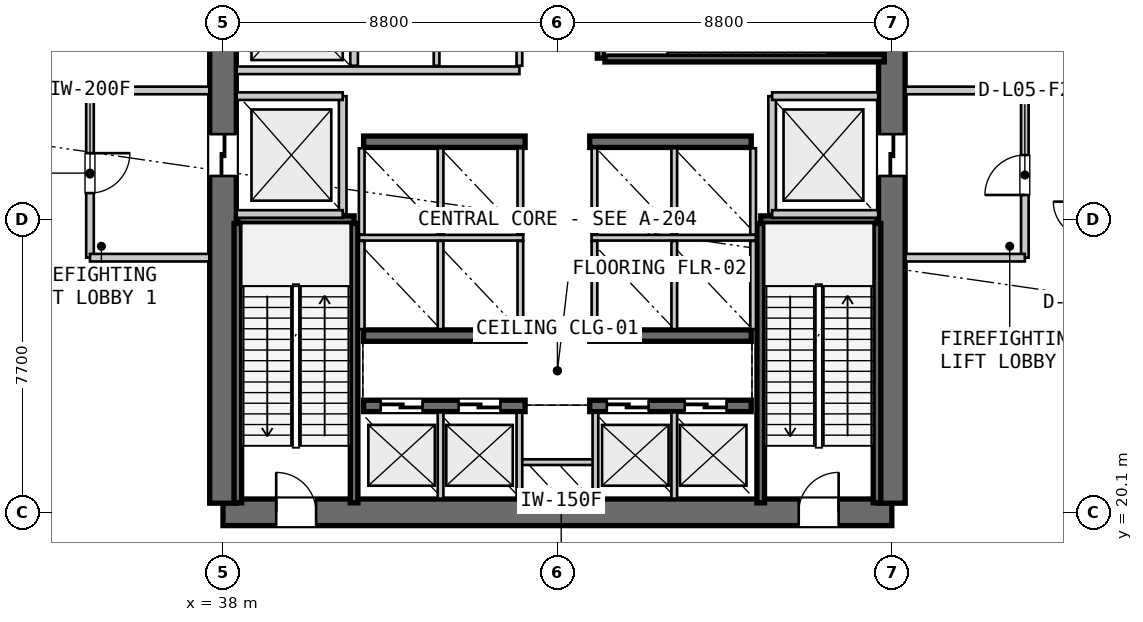
"""IFC4 building model, lengths in metres.
Left out: names, types, materials, properties, quantities, classifications, styles, units other than length and angle.
Written with IfcOpenShell. Run it as: python <this file> out.ifc"""

import sys

from ifc_helpers import new_model, si_unit, direction, frame, frame_2d, origin, place, context, subcontext, project, spatial, rectangle, extrude, source, transform, mapped, element, fill, save


model = new_model("IFC4")
c1 = context("Model", 3, precision=1e-05, world=origin(), true_north=direction((0.0, 1.0)))
c2 = subcontext(c1, "Body", "Model", "MODEL_VIEW")
j1 = project(units=[si_unit("LENGTHUNIT", "METRE"), si_unit("PLANEANGLEUNIT", "RADIAN")], contexts=[c1])
p1 = place(None, origin())
s1 = spatial("IfcSite", under=j1, at=p1, CompositionType="ELEMENT")
p2 = place(p1, origin())
s2 = spatial("IfcBuilding", under=s1, at=p2, CompositionType="ELEMENT")
p3 = place(p2, frame((0.0, 0.0, 24.0)))
s3 = spatial("IfcBuildingStorey", under=s2, at=p3, CompositionType="ELEMENT", Elevation=24.0)
p4 = place(p3, frame((38.0, 20.1, 0.0), z_axis=(0.0, 0.0, 1.0), x_axis=(1.0, 0.0, 0.0)))
e1 = element("IfcWall", 1, at=p4, inside=s3, PredefinedType="SHEAR", context=c2, shape_type="SweptSolid", body=[
    extrude(rectangle(XDim=17.6, YDim=0.7, at=frame_2d((8.8, 0.0))), origin(), (0.0, 0.0, 1.0), 5.12),
])
p5 = place(p4, frame((1.4, 0.0, 0.0)))
e2 = element("IfcOpeningElement", 2, at=p5, cuts=e1, PredefinedType="OPENING", context=c2, shape_type="SweptSolid", body=[
    extrude(rectangle(XDim=1.05, YDim=2.15, at=frame_2d((0.525, 1.075))), frame((0.0, 0.36, 0.0), z_axis=(0.0, -1.0, 0.0), x_axis=(1.0, 0.0, 0.0)), (0.0, 0.0, 1.0), 0.72),
])
p6 = place(p4, frame((15.15, 0.0, 0.0)))
e3 = element("IfcOpeningElement", 3, at=p6, cuts=e1, PredefinedType="OPENING", context=c2, shape_type="SweptSolid", body=[
    extrude(rectangle(XDim=1.05, YDim=2.15, at=frame_2d((0.525, 1.075))), frame((0.0, 0.36, 0.0), z_axis=(0.0, -1.0, 0.0), x_axis=(1.0, 0.0, 0.0)), (0.0, 0.0, 1.0), 0.72),
])
p7 = place(p3, frame((38.0, 35.26, 0.0), z_axis=(0.0, 0.0, 1.0), x_axis=(0.0, -1.0, 0.0)))
e4 = element("IfcWall", 4, at=p7, inside=s3, PredefinedType="SHEAR", context=c2, shape_type="SweptSolid", body=[
    extrude(rectangle(XDim=14.92, YDim=0.7, at=frame_2d((7.46, 0.0))), origin(), (0.0, 0.0, 1.0), 5.12),
])
p8 = place(p7, frame((5.21, 0.0, 0.0)))
e5 = element("IfcOpeningElement", 5, at=p8, cuts=e4, PredefinedType="OPENING", context=c2, shape_type="SweptSolid", body=[
    extrude(rectangle(XDim=1.1, YDim=2.2, at=frame_2d((0.55, 1.1))), frame((0.0, 0.36, 0.0), z_axis=(0.0, -1.0, 0.0), x_axis=(1.0, 0.0, 0.0)), (0.0, 0.0, 1.0), 0.72),
])
p9 = place(p3, frame((55.6, 20.34, 0.0), z_axis=(0.0, 0.0, 1.0), x_axis=(0.0, 1.0, 0.0)))
e6 = element("IfcWall", 6, at=p9, inside=s3, PredefinedType="SHEAR", context=c2, shape_type="SweptSolid", body=[
    extrude(rectangle(XDim=14.92, YDim=0.7, at=frame_2d((7.46, 0.0))), origin(), (0.0, 0.0, 1.0), 5.12),
])
p10 = place(p9, frame((12.71, 0.0, 0.0)))
e7 = element("IfcOpeningElement", 7, at=p10, cuts=e6, PredefinedType="OPENING", context=c2, shape_type="SweptSolid", body=[
    extrude(rectangle(XDim=1.05, YDim=2.15, at=frame_2d((0.525, 1.075))), frame((0.0, 0.36, 0.0), z_axis=(0.0, -1.0, 0.0), x_axis=(1.0, 0.0, 0.0)), (0.0, 0.0, 1.0), 0.72),
])
p11 = place(p9, frame((8.61, 0.0, 0.0)))
e8 = element("IfcOpeningElement", 8, at=p11, cuts=e6, PredefinedType="OPENING", context=c2, shape_type="SweptSolid", body=[
    extrude(rectangle(XDim=1.1, YDim=2.2, at=frame_2d((0.55, 1.1))), frame((0.0, 0.36, 0.0), z_axis=(0.0, -1.0, 0.0), x_axis=(1.0, 0.0, 0.0)), (0.0, 0.0, 1.0), 0.72),
])
p12 = place(p3, frame((41.7, 22.9, 0.0), z_axis=(0.0, 0.0, 1.0), x_axis=(1.0, 0.0, 0.0)))
e9 = element("IfcWall", 9, at=p12, inside=s3, PredefinedType="SHEAR", context=c2, shape_type="SweptSolid", body=[
    extrude(rectangle(XDim=4.25, YDim=0.3, at=frame_2d((2.125, 0.0))), origin(), (0.0, 0.0, 1.0), 5.12),
])
p13 = place(p12, frame((0.45, 0.0, 0.0)))
e10 = element("IfcOpeningElement", 10, at=p13, cuts=e9, PredefinedType="OPENING", context=c2, shape_type="SweptSolid", body=[
    extrude(rectangle(XDim=1.1, YDim=2.2, at=frame_2d((0.55, 1.1))), frame((0.0, 0.16, 0.0), z_axis=(0.0, -1.0, 0.0), x_axis=(1.0, 0.0, 0.0)), (0.0, 0.0, 1.0), 0.32),
])
p14 = place(p12, frame((2.5, 0.0, 0.0)))
e11 = element("IfcOpeningElement", 11, at=p14, cuts=e9, PredefinedType="OPENING", context=c2, shape_type="SweptSolid", body=[
    extrude(rectangle(XDim=1.1, YDim=2.2, at=frame_2d((0.55, 1.1))), frame((0.0, 0.16, 0.0), z_axis=(0.0, -1.0, 0.0), x_axis=(1.0, 0.0, 0.0)), (0.0, 0.0, 1.0), 0.32),
])
p15 = place(p3, frame((47.65, 22.9, 0.0), z_axis=(0.0, 0.0, 1.0), x_axis=(1.0, 0.0, 0.0)))
e12 = element("IfcWall", 12, at=p15, inside=s3, PredefinedType="SHEAR", context=c2, shape_type="SweptSolid", body=[
    extrude(rectangle(XDim=4.25, YDim=0.3, at=frame_2d((2.125, 0.0))), origin(), (0.0, 0.0, 1.0), 5.12),
])
p16 = place(p15, frame((0.45, 0.0, 0.0)))
e13 = element("IfcOpeningElement", 13, at=p16, cuts=e12, PredefinedType="OPENING", context=c2, shape_type="SweptSolid", body=[
    extrude(rectangle(XDim=1.1, YDim=2.2, at=frame_2d((0.55, 1.1))), frame((0.0, 0.16, 0.0), z_axis=(0.0, -1.0, 0.0), x_axis=(1.0, 0.0, 0.0)), (0.0, 0.0, 1.0), 0.32),
])
p17 = place(p15, frame((2.5, 0.0, 0.0)))
e14 = element("IfcOpeningElement", 14, at=p17, cuts=e12, PredefinedType="OPENING", context=c2, shape_type="SweptSolid", body=[
    extrude(rectangle(XDim=1.1, YDim=2.2, at=frame_2d((0.55, 1.1))), frame((0.0, 0.16, 0.0), z_axis=(0.0, -1.0, 0.0), x_axis=(1.0, 0.0, 0.0)), (0.0, 0.0, 1.0), 0.32),
])
for number, where, z_axis, x_axis in (
    (15, (41.7, 24.75, 0.0), (0.0, 0.0, 1.0), (1.0, 0.0, 0.0)),
    (16, (47.65, 24.75, 0.0), (0.0, 0.0, 1.0), (1.0, 0.0, 0.0)),
    (17, (41.7, 29.85, 0.0), (0.0, 0.0, 1.0), (1.0, 0.0, 0.0)),
    (18, (47.65, 29.85, 0.0), (0.0, 0.0, 1.0), (1.0, 0.0, 0.0)),
):
    element("IfcWall", number, at=place(p3, frame(where, z_axis=z_axis, x_axis=x_axis)), inside=s3, PredefinedType="SHEAR", context=c2, shape_type="SweptSolid", body=[
        extrude(rectangle(XDim=4.25, YDim=0.3, at=frame_2d((2.125, 0.0))), origin(), (0.0, 0.0, 1.0), 5.12),
    ])
p18 = place(p3, frame((38.39, 27.8, 0.0), z_axis=(0.0, 0.0, 1.0), x_axis=(1.0, 0.0, 0.0)))
e19 = element("IfcWall", 19, at=p18, inside=s3, PredefinedType="SHEAR", context=c2, shape_type="SweptSolid", body=[
    extrude(rectangle(XDim=3.06, YDim=0.2, at=frame_2d((1.53, 0.0))), origin(), (0.0, 0.0, 1.0), 5.12),
])
for number, where, z_axis, x_axis in (
    (20, (41.45, 27.7, 0.0), (0.0, 0.0, 1.0), (0.0, -1.0, 0.0)),
    (21, (38.39, 20.35, 0.0), (0.0, 0.0, 1.0), (0.0, 1.0, 0.0)),
):
    element("IfcWall", number, at=place(p3, frame(where, z_axis=z_axis, x_axis=x_axis)), inside=s3, PredefinedType="SHEAR", context=c2, shape_type="SweptSolid", body=[
        extrude(rectangle(XDim=7.35, YDim=0.2, at=frame_2d((3.675, 0.0))), origin(), (0.0, 0.0, 1.0), 5.12),
    ])
p19 = place(p3, frame((52.15, 27.8, 0.0), z_axis=(0.0, 0.0, 1.0), x_axis=(1.0, 0.0, 0.0)))
e22 = element("IfcWall", 22, at=p19, inside=s3, PredefinedType="SHEAR", context=c2, shape_type="SweptSolid", body=[
    extrude(rectangle(XDim=3.06, YDim=0.2, at=frame_2d((1.53, 0.0))), origin(), (0.0, 0.0, 1.0), 5.12),
])
for number, where, z_axis, x_axis in (
    (23, (55.21, 27.7, 0.0), (0.0, 0.0, 1.0), (0.0, -1.0, 0.0)),
    (24, (52.15, 20.35, 0.0), (0.0, 0.0, 1.0), (0.0, 1.0, 0.0)),
):
    element("IfcWall", number, at=place(p3, frame(where, z_axis=z_axis, x_axis=x_axis)), inside=s3, PredefinedType="SHEAR", context=c2, shape_type="SweptSolid", body=[
        extrude(rectangle(XDim=7.35, YDim=0.2, at=frame_2d((3.675, 0.0))), origin(), (0.0, 0.0, 1.0), 5.12),
    ])
p20 = place(p3, frame((47.95, 32.05, 0.0), z_axis=(0.0, 0.0, 1.0), x_axis=(0.0, 1.0, 0.0)))
e25 = element("IfcWall", 25, at=p20, inside=s3, PredefinedType="SHEAR", context=c2, shape_type="SweptSolid", body=[
    extrude(rectangle(XDim=3.06, YDim=0.2, at=frame_2d((1.53, 0.0))), origin(), (0.0, 0.0, 1.0), 5.12),
])
p21 = place(p3, frame((55.4, 32.05, 0.0), z_axis=(0.0, 0.0, 1.0), x_axis=(-1.0, 0.0, 0.0)))
e26 = element("IfcWall", 26, at=p21, inside=s3, PredefinedType="SHEAR", context=c2, shape_type="SweptSolid", body=[
    extrude(rectangle(XDim=7.35, YDim=0.2, at=frame_2d((3.675, 0.0))), origin(), (0.0, 0.0, 1.0), 5.12),
])
p22 = place(p3, frame((45.8, 21.42, 0.0), z_axis=(0.0, 0.0, 1.0), x_axis=(1.0, 0.0, 0.0)))
e27 = element("IfcWall", 27, at=p22, inside=s3, PredefinedType="PARTITIONING", context=c2, shape_type="SweptSolid", body=[
    extrude(rectangle(XDim=2.0, YDim=0.15, at=frame_2d((1.0, 0.0))), origin(), (0.0, 0.0, 1.0), 2.295),
])
for number, where, z_axis, x_axis in (
    (28, (45.8, 20.48, 0.0), (0.0, 0.0, 1.0), (0.0, 1.0, 0.0)),
    (29, (47.8, 20.48, 0.0), (0.0, 0.0, 1.0), (0.0, 1.0, 0.0)),
):
    element("IfcWall", number, at=place(p3, frame(where, z_axis=z_axis, x_axis=x_axis)), inside=s3, PredefinedType="PARTITIONING", context=c2, shape_type="SweptSolid", body=[
        extrude(rectangle(XDim=2.24, YDim=0.15, at=frame_2d((1.12, 0.0))), origin(), (0.0, 0.0, 1.0), 2.295),
    ])
p23 = place(p3, frame((41.15, 27.95, 0.0), z_axis=(0.0, 0.0, 1.0), x_axis=(0.0, 1.0, 0.0)))
e30 = element("IfcWall", 30, at=p23, inside=s3, PredefinedType="PARTITIONING", context=c2, shape_type="SweptSolid", body=[
    extrude(rectangle(XDim=3.1, YDim=0.2, at=frame_2d((1.55, 0.0))), origin(), (0.0, 0.0, 1.0), 2.295),
])
for number, where, z_axis, x_axis in (
    (31, (38.36, 27.95, 0.0), (0.0, 0.0, 1.0), (1.0, 0.0, 0.0)),
    (32, (38.36, 31.05, 0.0), (0.0, 0.0, 1.0), (1.0, 0.0, 0.0)),
):
    element("IfcWall", number, at=place(p3, frame(where, z_axis=z_axis, x_axis=x_axis)), inside=s3, PredefinedType="PARTITIONING", context=c2, shape_type="SweptSolid", body=[
        extrude(rectangle(XDim=2.79, YDim=0.2, at=frame_2d((1.395, 0.0))), origin(), (0.0, 0.0, 1.0), 2.295),
    ])
p24 = place(p3, frame((34.5, 31.2, 0.0), z_axis=(0.0, 0.0, 1.0), x_axis=(0.0, -1.0, 0.0)))
e33 = element("IfcWall", 33, at=p24, inside=s3, PredefinedType="PARTITIONING", context=c2, shape_type="SweptSolid", body=[
    extrude(rectangle(XDim=4.4, YDim=0.2, at=frame_2d((2.2, 0.0))), origin(), (0.0, 0.0, 1.0), 2.295),
])
p25 = place(p24, frame((1.65, 0.0, 0.0)))
e34 = element("IfcOpeningElement", 34, at=p25, cuts=e33, PredefinedType="OPENING", context=c2, shape_type="SweptSolid", body=[
    extrude(rectangle(XDim=1.05, YDim=2.15, at=frame_2d((0.525, 1.075))), frame((0.0, 0.11, 0.0), z_axis=(0.0, -1.0, 0.0), x_axis=(1.0, 0.0, 0.0)), (0.0, 0.0, 1.0), 0.22),
])
for number, where, z_axis, x_axis in (
    (35, (34.5, 26.8, 0.0), (0.0, 0.0, 1.0), (1.0, 0.0, 0.0)),
    (36, (34.5, 31.2, 0.0), (0.0, 0.0, 1.0), (1.0, 0.0, 0.0)),
):
    element("IfcWall", number, at=place(p3, frame(where, z_axis=z_axis, x_axis=x_axis)), inside=s3, PredefinedType="PARTITIONING", context=c2, shape_type="SweptSolid", body=[
        extrude(rectangle(XDim=3.14, YDim=0.2, at=frame_2d((1.57, 0.0))), origin(), (0.0, 0.0, 1.0), 2.295),
    ])
p26 = place(p3, frame((52.45, 27.95, 0.0), z_axis=(0.0, 0.0, 1.0), x_axis=(0.0, 1.0, 0.0)))
e37 = element("IfcWall", 37, at=p26, inside=s3, PredefinedType="PARTITIONING", context=c2, shape_type="SweptSolid", body=[
    extrude(rectangle(XDim=3.1, YDim=0.2, at=frame_2d((1.55, 0.0))), origin(), (0.0, 0.0, 1.0), 2.295),
])
for number, where, z_axis, x_axis in (
    (38, (52.45, 27.95, 0.0), (0.0, 0.0, 1.0), (1.0, 0.0, 0.0)),
    (39, (52.45, 31.05, 0.0), (0.0, 0.0, 1.0), (1.0, 0.0, 0.0)),
):
    element("IfcWall", number, at=place(p3, frame(where, z_axis=z_axis, x_axis=x_axis)), inside=s3, PredefinedType="PARTITIONING", context=c2, shape_type="SweptSolid", body=[
        extrude(rectangle(XDim=2.79, YDim=0.2, at=frame_2d((1.395, 0.0))), origin(), (0.0, 0.0, 1.0), 2.295),
    ])
p27 = place(p3, frame((59.1, 26.8, 0.0), z_axis=(0.0, 0.0, 1.0), x_axis=(0.0, 1.0, 0.0)))
e40 = element("IfcWall", 40, at=p27, inside=s3, PredefinedType="PARTITIONING", context=c2, shape_type="SweptSolid", body=[
    extrude(rectangle(XDim=4.4, YDim=0.2, at=frame_2d((2.2, 0.0))), origin(), (0.0, 0.0, 1.0), 2.295),
])
p28 = place(p27, frame((1.65, 0.0, 0.0)))
e41 = element("IfcOpeningElement", 41, at=p28, cuts=e40, PredefinedType="OPENING", context=c2, shape_type="SweptSolid", body=[
    extrude(rectangle(XDim=1.05, YDim=2.15, at=frame_2d((0.525, 1.075))), frame((0.0, 0.11, 0.0), z_axis=(0.0, -1.0, 0.0), x_axis=(1.0, 0.0, 0.0)), (0.0, 0.0, 1.0), 0.22),
])
for number, where, z_axis, x_axis in (
    (42, (55.96, 26.8, 0.0), (0.0, 0.0, 1.0), (1.0, 0.0, 0.0)),
    (43, (55.96, 31.2, 0.0), (0.0, 0.0, 1.0), (1.0, 0.0, 0.0)),
):
    element("IfcWall", number, at=place(p3, frame(where, z_axis=z_axis, x_axis=x_axis)), inside=s3, PredefinedType="PARTITIONING", context=c2, shape_type="SweptSolid", body=[
        extrude(rectangle(XDim=3.14, YDim=0.2, at=frame_2d((1.57, 0.0))), origin(), (0.0, 0.0, 1.0), 2.295),
    ])
for number, where, z_axis, x_axis in (
    (44, (43.725, 20.46, 0.0), (0.0, 0.0, 1.0), (0.0, 1.0, 0.0)),
    (45, (49.875, 20.46, 0.0), (0.0, 0.0, 1.0), (0.0, 1.0, 0.0)),
):
    element("IfcWall", number, at=place(p3, frame(where, z_axis=z_axis, x_axis=x_axis)), inside=s3, PredefinedType="PARTITIONING", context=c2, shape_type="SweptSolid", body=[
        extrude(rectangle(XDim=2.27, YDim=0.15, at=frame_2d((1.135, 0.0))), origin(), (0.0, 0.0, 1.0), 2.295),
    ])
p29 = place(p3, frame((41.58, 27.325, 0.0), z_axis=(0.0, 0.0, 1.0), x_axis=(1.0, 0.0, 0.0)))
e46 = element("IfcWall", 46, at=p29, inside=s3, PredefinedType="PARTITIONING", context=c2, shape_type="SweptSolid", body=[
    extrude(rectangle(XDim=4.32, YDim=0.15, at=frame_2d((2.16, 0.0))), origin(), (0.0, 0.0, 1.0), 2.295),
])
p30 = place(p3, frame((47.7, 27.325, 0.0), z_axis=(0.0, 0.0, 1.0), x_axis=(1.0, 0.0, 0.0)))
e47 = element("IfcWall", 47, at=p30, inside=s3, PredefinedType="PARTITIONING", context=c2, shape_type="SweptSolid", body=[
    extrude(rectangle(XDim=4.32, YDim=0.15, at=frame_2d((2.16, 0.0))), origin(), (0.0, 0.0, 1.0), 2.295),
])
for number, where, z_axis, x_axis in (
    (48, (41.65, 24.92, 0.0), (0.0, 0.0, 1.0), (0.0, 1.0, 0.0)),
    (49, (43.725, 24.92, 0.0), (0.0, 0.0, 1.0), (0.0, 1.0, 0.0)),
    (50, (45.825, 24.92, 0.0), (0.0, 0.0, 1.0), (0.0, 1.0, 0.0)),
    (51, (47.775, 24.92, 0.0), (0.0, 0.0, 1.0), (0.0, 1.0, 0.0)),
    (52, (49.875, 24.92, 0.0), (0.0, 0.0, 1.0), (0.0, 1.0, 0.0)),
    (53, (51.95, 24.92, 0.0), (0.0, 0.0, 1.0), (0.0, 1.0, 0.0)),
):
    element("IfcWall", number, at=place(p3, frame(where, z_axis=z_axis, x_axis=x_axis)), inside=s3, PredefinedType="PARTITIONING", context=c2, shape_type="SweptSolid", body=[
        extrude(rectangle(XDim=2.32, YDim=0.15, at=frame_2d((1.16, 0.0))), origin(), (0.0, 0.0, 1.0), 2.295),
    ])
for number, where, z_axis, x_axis in (
    (54, (41.65, 27.41, 0.0), (0.0, 0.0, 1.0), (0.0, 1.0, 0.0)),
    (55, (43.725, 27.41, 0.0), (0.0, 0.0, 1.0), (0.0, 1.0, 0.0)),
    (56, (45.825, 27.41, 0.0), (0.0, 0.0, 1.0), (0.0, 1.0, 0.0)),
    (57, (47.775, 27.41, 0.0), (0.0, 0.0, 1.0), (0.0, 1.0, 0.0)),
    (58, (49.875, 27.41, 0.0), (0.0, 0.0, 1.0), (0.0, 1.0, 0.0)),
    (59, (51.95, 27.41, 0.0), (0.0, 0.0, 1.0), (0.0, 1.0, 0.0)),
):
    element("IfcWall", number, at=place(p3, frame(where, z_axis=z_axis, x_axis=x_axis)), inside=s3, PredefinedType="PARTITIONING", context=c2, shape_type="SweptSolid", body=[
        extrude(rectangle(XDim=2.27, YDim=0.15, at=frame_2d((1.135, 0.0))), origin(), (0.0, 0.0, 1.0), 2.295),
    ])
p31 = place(p3, frame((41.45, 31.85, 0.0), z_axis=(0.0, 0.0, 1.0), x_axis=(0.0, 1.0, 0.0)))
e60 = element("IfcWall", 60, at=p31, inside=s3, PredefinedType="PARTITIONING", context=c2, shape_type="SweptSolid", body=[
    extrude(rectangle(XDim=3.29, YDim=0.2, at=frame_2d((1.645, 0.0))), origin(), (0.0, 0.0, 1.0), 2.295),
])
p32 = place(p3, frame((38.36, 31.73, 0.0), z_axis=(0.0, 0.0, 1.0), x_axis=(1.0, 0.0, 0.0)))
e61 = element("IfcWall", 61, at=p32, inside=s3, PredefinedType="PARTITIONING", context=c2, shape_type="SweptSolid", body=[
    extrude(rectangle(XDim=7.44, YDim=0.2, at=frame_2d((3.72, 0.0))), origin(), (0.0, 0.0, 1.0), 2.295),
])
p33 = place(p3, frame((45.8, 31.85, 0.0), z_axis=(0.0, 0.0, 1.0), x_axis=(0.0, 1.0, 0.0)))
e62 = element("IfcWall", 62, at=p33, inside=s3, PredefinedType="PARTITIONING", context=c2, shape_type="SweptSolid", body=[
    extrude(rectangle(XDim=3.29, YDim=0.15, at=frame_2d((1.645, 0.0))), origin(), (0.0, 0.0, 1.0), 2.295),
])
p34 = place(p3, frame((43.62, 31.85, 0.0), z_axis=(0.0, 0.0, 1.0), x_axis=(0.0, 1.0, 0.0)))
e63 = element("IfcWall", 63, at=p34, inside=s3, PredefinedType="PLUMBINGWALL", context=c2, shape_type="SweptSolid", body=[
    extrude(rectangle(XDim=3.29, YDim=0.15, at=frame_2d((1.645, 0.0))), origin(), (0.0, 0.0, 1.0), 2.295),
])
m1 = source(origin(), c2, "Body", "SweptSolid", [
    extrude(rectangle(XDim=1.05, YDim=2.15, at=frame_2d((0.525, 1.075))), frame((0.0, 0.025, 0.0), z_axis=(0.0, -1.0, 0.0), x_axis=(1.0, 0.0, 0.0)), (0.0, 0.0, 1.0), 0.05),
])
p35 = place(p5, origin())
e64 = element("IfcDoor", 64, at=p35, inside=s3, OperationType="SINGLE_SWING_LEFT", PredefinedType="DOOR", context=c2, shape_type="MappedRepresentation", body=[
    mapped(m1, transform((0.0, 0.0, 0.0), scale=1.0)),
])
fill(e2, e64)
p36 = place(p6, origin())
e65 = element("IfcDoor", 65, at=p36, inside=s3, OperationType="SINGLE_SWING_RIGHT", PredefinedType="DOOR", context=c2, shape_type="MappedRepresentation", body=[
    mapped(m1, transform((0.0, 0.0, 0.0), scale=1.0)),
])
fill(e3, e65)
m2 = source(origin(), c2, "Body", "SweptSolid", [
    extrude(rectangle(XDim=1.1, YDim=2.2, at=frame_2d((0.55, 1.1))), frame((0.0, 0.025, 0.0), z_axis=(0.0, -1.0, 0.0), x_axis=(1.0, 0.0, 0.0)), (0.0, 0.0, 1.0), 0.05),
])
p37 = place(p8, origin())
e66 = element("IfcDoor", 66, at=p37, inside=s3, OperationType="SLIDING_TO_LEFT", PredefinedType="DOOR", context=c2, shape_type="MappedRepresentation", body=[
    mapped(m2, transform((0.0, 0.0, 0.0), scale=1.0)),
])
fill(e5, e66)
p38 = place(p11, origin())
e67 = element("IfcDoor", 67, at=p38, inside=s3, OperationType="SLIDING_TO_RIGHT", PredefinedType="DOOR", context=c2, shape_type="MappedRepresentation", body=[
    mapped(m2, transform((0.0, 0.0, 0.0), scale=1.0)),
])
fill(e8, e67)
p39 = place(p13, origin())
e68 = element("IfcDoor", 68, at=p39, inside=s3, OperationType="SLIDING_TO_LEFT", PredefinedType="DOOR", context=c2, shape_type="MappedRepresentation", body=[
    mapped(m2, transform((0.0, 0.0, 0.0), scale=1.0)),
])
fill(e10, e68)
p40 = place(p14, origin())
e69 = element("IfcDoor", 69, at=p40, inside=s3, OperationType="SLIDING_TO_LEFT", PredefinedType="DOOR", context=c2, shape_type="MappedRepresentation", body=[
    mapped(m2, transform((0.0, 0.0, 0.0), scale=1.0)),
])
fill(e11, e69)
p41 = place(p16, origin())
e70 = element("IfcDoor", 70, at=p41, inside=s3, OperationType="SLIDING_TO_LEFT", PredefinedType="DOOR", context=c2, shape_type="MappedRepresentation", body=[
    mapped(m2, transform((0.0, 0.0, 0.0), scale=1.0)),
])
fill(e13, e70)
p42 = place(p17, origin())
e71 = element("IfcDoor", 71, at=p42, inside=s3, OperationType="SLIDING_TO_LEFT", PredefinedType="DOOR", context=c2, shape_type="MappedRepresentation", body=[
    mapped(m2, transform((0.0, 0.0, 0.0), scale=1.0)),
])
fill(e14, e71)
p43 = place(p25, origin())
e72 = element("IfcDoor", 72, at=p43, inside=s3, OperationType="SINGLE_SWING_LEFT", PredefinedType="DOOR", context=c2, shape_type="MappedRepresentation", body=[
    mapped(m1, transform((0.0, 0.0, 0.0), scale=1.0)),
])
fill(e34, e72)
p44 = place(p28, origin())
e73 = element("IfcDoor", 73, at=p44, inside=s3, OperationType="SINGLE_SWING_LEFT", PredefinedType="DOOR", context=c2, shape_type="MappedRepresentation", body=[
    mapped(m1, transform((0.0, 0.0, 0.0), scale=1.0)),
])
fill(e41, e73)
save(model, sys.argv[1])
